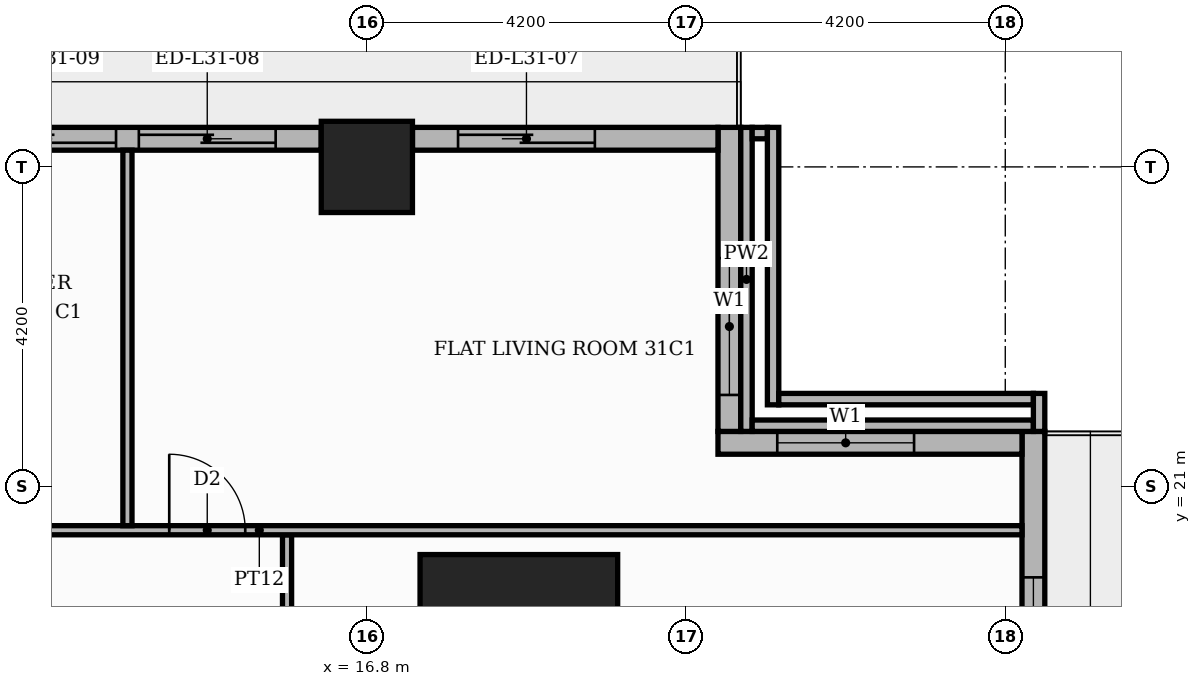
"""IFC4 building model, lengths in metres.
Left out: names, types, materials, properties, quantities, classifications, styles, units other than length and angle.
Written with IfcOpenShell. Run it as: python <this file> out.ifc"""

import sys

from ifc_helpers import new_model, si_unit, direction, frame, frame_2d, origin, origin_2d, place, context, subcontext, project, spatial, rectangle, extrude, element, fill, save


model = new_model("IFC4")
c1 = context("Model", 3, precision=1e-05, world=origin(), true_north=direction((0.0, 1.0)))
c2 = subcontext(c1, "Body", "Model", "MODEL_VIEW")
j1 = project(units=[si_unit("LENGTHUNIT", "METRE"), si_unit("PLANEANGLEUNIT", "RADIAN")], contexts=[c1])
p1 = place(None, origin())
s1 = spatial("IfcSite", under=j1, at=p1, CompositionType="ELEMENT")
p2 = place(p1, origin())
s2 = spatial("IfcBuilding", under=s1, at=p2, CompositionType="ELEMENT")
p3 = place(p2, frame((0.0, 0.0, 133.8)))
s3 = spatial("IfcBuildingStorey", under=s2, at=p3, CompositionType="ELEMENT", Elevation=133.8)
p4 = place(p3, frame((18.8, 18.8, 0.0), z_axis=(0.0, 0.0, 1.0), x_axis=(1.0, 0.0, 0.0)))
e1 = element("IfcColumn", 1, at=p4, inside=s3, PredefinedType="COLUMN", context=c2, shape_type="SweptSolid", body=[
    extrude(rectangle(XDim=2.6, YDim=2.6, at=origin_2d()), origin(), (0.0, 0.0, 1.0), 3.9),
])
p5 = place(p3, frame((16.8, 25.2, 0.0), z_axis=(0.0, 0.0, 1.0), x_axis=(1.0, 0.0, 0.0)))
e2 = element("IfcColumn", 2, at=p5, inside=s3, PredefinedType="COLUMN", context=c2, shape_type="SweptSolid", body=[
    extrude(rectangle(XDim=1.2, YDim=1.2, at=origin_2d()), origin(), (0.0, 0.0, 1.0), 3.9),
])
p6 = place(p3, frame((25.57, 17.4, 0.0), z_axis=(0.0, 0.0, 1.0), x_axis=(0.0, 1.0, 0.0)))
e3 = element("IfcWall", 3, at=p6, inside=s3, PredefinedType="STANDARD", context=c2, shape_type="SweptSolid", body=[
    extrude(rectangle(XDim=4.32, YDim=0.3, at=frame_2d((2.16, 0.0))), origin(), (0.0, 0.0, 1.0), 3.48),
])
p7 = place(p6, frame((0.6, 0.0, 0.9)))
e4 = element("IfcOpeningElement", 4, at=p7, cuts=e3, PredefinedType="OPENING", context=c2, shape_type="SweptSolid", body=[
    extrude(rectangle(XDim=1.8, YDim=2.1, at=frame_2d((0.9, 1.05))), frame((0.0, 0.16, 0.0), z_axis=(0.0, -1.0, 0.0), x_axis=(1.0, 0.0, 0.0)), (0.0, 0.0, 1.0), 0.32),
])
p8 = place(p3, frame((25.42, 21.57, 0.0), z_axis=(0.0, 0.0, 1.0), x_axis=(-1.0, 0.0, 0.0)))
e5 = element("IfcWall", 5, at=p8, inside=s3, PredefinedType="STANDARD", context=c2, shape_type="SweptSolid", body=[
    extrude(rectangle(XDim=4.0, YDim=0.3, at=frame_2d((2.0, 0.0))), origin(), (0.0, 0.0, 1.0), 3.48),
])
p9 = place(p8, frame((1.42, 0.0, 0.9)))
e6 = element("IfcOpeningElement", 6, at=p9, cuts=e5, PredefinedType="OPENING", context=c2, shape_type="SweptSolid", body=[
    extrude(rectangle(XDim=1.8, YDim=2.1, at=frame_2d((0.9, 1.05))), frame((0.0, 0.16, 0.0), z_axis=(0.0, -1.0, 0.0), x_axis=(1.0, 0.0, 0.0)), (0.0, 0.0, 1.0), 0.32),
])
p10 = place(p3, frame((21.57, 21.72, 0.0), z_axis=(0.0, 0.0, 1.0), x_axis=(0.0, 1.0, 0.0)))
e7 = element("IfcWall", 7, at=p10, inside=s3, PredefinedType="STANDARD", context=c2, shape_type="SweptSolid", body=[
    extrude(rectangle(XDim=4.0, YDim=0.3, at=frame_2d((2.0, 0.0))), origin(), (0.0, 0.0, 1.0), 3.48),
])
p11 = place(p10, frame((0.48, 0.0, 0.9)))
e8 = element("IfcOpeningElement", 8, at=p11, cuts=e7, PredefinedType="OPENING", context=c2, shape_type="SweptSolid", body=[
    extrude(rectangle(XDim=1.8, YDim=2.1, at=frame_2d((0.9, 1.05))), frame((0.0, 0.16, 0.0), z_axis=(0.0, -1.0, 0.0), x_axis=(1.0, 0.0, 0.0)), (0.0, 0.0, 1.0), 0.32),
])
p12 = place(p3, frame((21.42, 25.57, 0.0), z_axis=(0.0, 0.0, 1.0), x_axis=(-1.0, 0.0, 0.0)))
e9 = element("IfcWall", 9, at=p12, inside=s3, PredefinedType="STANDARD", context=c2, shape_type="SweptSolid", body=[
    extrude(rectangle(XDim=4.02, YDim=0.3, at=frame_2d((2.01, 0.0))), origin(), (0.0, 0.0, 1.0), 3.48),
])
p13 = place(p12, frame((1.62, 0.0, 0.0)))
e10 = element("IfcOpeningElement", 10, at=p13, cuts=e9, PredefinedType="OPENING", context=c2, shape_type="SweptSolid", body=[
    extrude(rectangle(XDim=1.8, YDim=2.4, at=frame_2d((0.9, 1.2))), frame((0.0, 0.16, 0.0), z_axis=(0.0, -1.0, 0.0), x_axis=(1.0, 0.0, 0.0)), (0.0, 0.0, 1.0), 0.32),
])
p14 = place(p3, frame((16.2, 25.57, 0.0), z_axis=(0.0, 0.0, 1.0), x_axis=(-1.0, 0.0, 0.0)))
e11 = element("IfcWall", 11, at=p14, inside=s3, PredefinedType="STANDARD", context=c2, shape_type="SweptSolid", body=[
    extrude(rectangle(XDim=7.2, YDim=0.3, at=frame_2d((3.6, 0.0))), origin(), (0.0, 0.0, 1.0), 3.48),
])
p15 = place(p14, frame((0.6, 0.0, 0.0)))
e12 = element("IfcOpeningElement", 12, at=p15, cuts=e11, PredefinedType="OPENING", context=c2, shape_type="SweptSolid", body=[
    extrude(rectangle(XDim=1.8, YDim=2.4, at=frame_2d((0.9, 1.2))), frame((0.0, 0.16, 0.0), z_axis=(0.0, -1.0, 0.0), x_axis=(1.0, 0.0, 0.0)), (0.0, 0.0, 1.0), 0.32),
])
p16 = place(p14, frame((2.7, 0.0, 0.0)))
e13 = element("IfcOpeningElement", 13, at=p16, cuts=e11, PredefinedType="OPENING", context=c2, shape_type="SweptSolid", body=[
    extrude(rectangle(XDim=1.8, YDim=2.4, at=frame_2d((0.9, 1.2))), frame((0.0, 0.16, 0.0), z_axis=(0.0, -1.0, 0.0), x_axis=(1.0, 0.0, 0.0)), (0.0, 0.0, 1.0), 0.32),
])
p17 = place(p14, frame((4.8, 0.0, 0.9)))
e14 = element("IfcOpeningElement", 14, at=p17, cuts=e11, PredefinedType="OPENING", context=c2, shape_type="SweptSolid", body=[
    extrude(rectangle(XDim=1.8, YDim=2.1, at=frame_2d((0.9, 1.05))), frame((0.0, 0.16, 0.0), z_axis=(0.0, -1.0, 0.0), x_axis=(1.0, 0.0, 0.0)), (0.0, 0.0, 1.0), 0.32),
])
p18 = place(p3, frame((21.795, 21.72, 0.0), z_axis=(0.0, 0.0, 1.0), x_axis=(0.0, 1.0, 0.0)))
e15 = element("IfcWall", 15, at=p18, inside=s3, PredefinedType="PARAPET", context=c2, shape_type="SweptSolid", body=[
    extrude(rectangle(XDim=4.0, YDim=0.15, at=frame_2d((2.0, 0.0))), origin(), (0.0, 0.0, 1.0), 1.1),
])
p19 = place(p3, frame((21.87, 25.645, 0.0), z_axis=(0.0, 0.0, 1.0), x_axis=(1.0, 0.0, 0.0)))
e16 = element("IfcWall", 16, at=p19, inside=s3, PredefinedType="PARAPET", context=c2, shape_type="SweptSolid", body=[
    extrude(rectangle(XDim=0.2, YDim=0.15, at=frame_2d((0.1, 0.0))), origin(), (0.0, 0.0, 1.0), 1.1),
])
p20 = place(p3, frame((21.87, 21.795, 0.0), z_axis=(0.0, 0.0, 1.0), x_axis=(1.0, 0.0, 0.0)))
e17 = element("IfcWall", 17, at=p20, inside=s3, PredefinedType="PARAPET", context=c2, shape_type="SweptSolid", body=[
    extrude(rectangle(XDim=3.7, YDim=0.15, at=frame_2d((1.85, 0.0))), origin(), (0.0, 0.0, 1.0), 1.1),
])
p21 = place(p3, frame((22.145, 22.07, 0.0), z_axis=(0.0, 0.0, 1.0), x_axis=(0.0, 1.0, 0.0)))
e18 = element("IfcWall", 18, at=p21, inside=s3, PredefinedType="PARAPET", context=c2, shape_type="SweptSolid", body=[
    extrude(rectangle(XDim=3.65, YDim=0.15, at=frame_2d((1.825, 0.0))), origin(), (0.0, 0.0, 1.0), 1.1),
])
p22 = place(p3, frame((22.22, 22.145, 0.0), z_axis=(0.0, 0.0, 1.0), x_axis=(1.0, 0.0, 0.0)))
e19 = element("IfcWall", 19, at=p22, inside=s3, PredefinedType="PARAPET", context=c2, shape_type="SweptSolid", body=[
    extrude(rectangle(XDim=3.35, YDim=0.15, at=frame_2d((1.675, 0.0))), origin(), (0.0, 0.0, 1.0), 1.1),
])
p23 = place(p3, frame((25.645, 21.72, 0.0), z_axis=(0.0, 0.0, 1.0), x_axis=(0.0, 1.0, 0.0)))
e20 = element("IfcWall", 20, at=p23, inside=s3, PredefinedType="PARAPET", context=c2, shape_type="SweptSolid", body=[
    extrude(rectangle(XDim=0.5, YDim=0.15, at=frame_2d((0.25, 0.0))), origin(), (0.0, 0.0, 1.0), 1.1),
])
p24 = place(p3, frame((15.75, 13.75, 0.0), z_axis=(0.0, 0.0, 1.0), x_axis=(0.0, 1.0, 0.0)))
e21 = element("IfcWall", 21, at=p24, inside=s3, PredefinedType="PARTITIONING", context=c2, shape_type="SweptSolid", body=[
    extrude(rectangle(XDim=6.61, YDim=0.12, at=frame_2d((3.305, 0.0))), origin(), (0.0, 0.0, 1.0), 3.48),
])
p25 = place(p24, frame((2.785, 0.0, 0.0)))
e22 = element("IfcOpeningElement", 22, at=p25, cuts=e21, PredefinedType="OPENING", context=c2, shape_type="SweptSolid", body=[
    extrude(rectangle(XDim=1.0, YDim=2.1, at=frame_2d((0.5, 1.05))), frame((0.0, 0.07, 0.0), z_axis=(0.0, -1.0, 0.0), x_axis=(1.0, 0.0, 0.0)), (0.0, 0.0, 1.0), 0.14),
])
p26 = place(p3, frame((5.35, 20.42, 0.0), z_axis=(0.0, 0.0, 1.0), x_axis=(1.0, 0.0, 0.0)))
e23 = element("IfcWall", 23, at=p26, inside=s3, PredefinedType="PARTITIONING", context=c2, shape_type="SweptSolid", body=[
    extrude(rectangle(XDim=20.07, YDim=0.12, at=frame_2d((10.035, 0.0))), origin(), (0.0, 0.0, 1.0), 3.48),
])
p27 = place(p26, frame((8.85, 0.0, 0.0)))
e24 = element("IfcOpeningElement", 24, at=p27, cuts=e23, PredefinedType="OPENING", context=c2, shape_type="SweptSolid", body=[
    extrude(rectangle(XDim=1.0, YDim=2.1, at=frame_2d((0.5, 1.05))), frame((0.0, 0.07, 0.0), z_axis=(0.0, -1.0, 0.0), x_axis=(1.0, 0.0, 0.0)), (0.0, 0.0, 1.0), 0.14),
])
p28 = place(p26, frame((5.75, 0.0, 0.0)))
e25 = element("IfcOpeningElement", 25, at=p28, cuts=e23, PredefinedType="OPENING", context=c2, shape_type="SweptSolid", body=[
    extrude(rectangle(XDim=0.9, YDim=2.1, at=frame_2d((0.45, 1.05))), frame((0.0, 0.07, 0.0), z_axis=(0.0, -1.0, 0.0), x_axis=(1.0, 0.0, 0.0)), (0.0, 0.0, 1.0), 0.14),
])
p29 = place(p3, frame((13.65, 20.48, 0.0), z_axis=(0.0, 0.0, 1.0), x_axis=(0.0, 1.0, 0.0)))
e26 = element("IfcWall", 26, at=p29, inside=s3, PredefinedType="PARTITIONING", context=c2, shape_type="SweptSolid", body=[
    extrude(rectangle(XDim=4.94, YDim=0.12, at=frame_2d((2.47, 0.0))), origin(), (0.0, 0.0, 1.0), 3.48),
])
p30 = place(p7, origin())
e27 = element("IfcWindow", 27, at=p30, inside=s3, PartitioningType="SINGLE_PANEL", PredefinedType="WINDOW", context=c2, shape_type="SweptSolid", body=[
    extrude(rectangle(XDim=1.8, YDim=2.1, at=frame_2d((0.9, 1.05))), frame((0.0, 0.03, 0.0), z_axis=(0.0, -1.0, 0.0), x_axis=(1.0, 0.0, 0.0)), (0.0, 0.0, 1.0), 0.06),
])
fill(e4, e27)
p31 = place(p9, origin())
e28 = element("IfcWindow", 28, at=p31, inside=s3, PartitioningType="SINGLE_PANEL", PredefinedType="WINDOW", context=c2, shape_type="SweptSolid", body=[
    extrude(rectangle(XDim=1.8, YDim=2.1, at=frame_2d((0.9, 1.05))), frame((0.0, 0.03, 0.0), z_axis=(0.0, -1.0, 0.0), x_axis=(1.0, 0.0, 0.0)), (0.0, 0.0, 1.0), 0.06),
])
fill(e6, e28)
p32 = place(p11, origin())
e29 = element("IfcWindow", 29, at=p32, inside=s3, PartitioningType="SINGLE_PANEL", PredefinedType="WINDOW", context=c2, shape_type="SweptSolid", body=[
    extrude(rectangle(XDim=1.8, YDim=2.1, at=frame_2d((0.9, 1.05))), frame((0.0, 0.03, 0.0), z_axis=(0.0, -1.0, 0.0), x_axis=(1.0, 0.0, 0.0)), (0.0, 0.0, 1.0), 0.06),
])
fill(e8, e29)
p33 = place(p13, origin())
e30 = element("IfcDoor", 30, at=p33, inside=s3, OperationType="SLIDING_TO_RIGHT", PredefinedType="DOOR", context=c2, shape_type="SweptSolid", body=[
    extrude(rectangle(XDim=1.8, YDim=2.4, at=frame_2d((0.9, 1.2))), frame((0.0, 0.025, 0.0), z_axis=(0.0, -1.0, 0.0), x_axis=(1.0, 0.0, 0.0)), (0.0, 0.0, 1.0), 0.05),
])
fill(e10, e30)
p34 = place(p15, origin())
e31 = element("IfcDoor", 31, at=p34, inside=s3, OperationType="SLIDING_TO_LEFT", PredefinedType="DOOR", context=c2, shape_type="SweptSolid", body=[
    extrude(rectangle(XDim=1.8, YDim=2.4, at=frame_2d((0.9, 1.2))), frame((0.0, 0.025, 0.0), z_axis=(0.0, -1.0, 0.0), x_axis=(1.0, 0.0, 0.0)), (0.0, 0.0, 1.0), 0.05),
])
fill(e12, e31)
p35 = place(p16, origin())
e32 = element("IfcDoor", 32, at=p35, inside=s3, OperationType="SLIDING_TO_RIGHT", PredefinedType="DOOR", context=c2, shape_type="SweptSolid", body=[
    extrude(rectangle(XDim=1.8, YDim=2.4, at=frame_2d((0.9, 1.2))), frame((0.0, 0.025, 0.0), z_axis=(0.0, -1.0, 0.0), x_axis=(1.0, 0.0, 0.0)), (0.0, 0.0, 1.0), 0.05),
])
fill(e13, e32)
p36 = place(p27, origin())
e33 = element("IfcDoor", 33, at=p36, inside=s3, OperationType="SINGLE_SWING_LEFT", PredefinedType="DOOR", context=c2, shape_type="SweptSolid", body=[
    extrude(rectangle(XDim=1.0, YDim=2.1, at=frame_2d((0.5, 1.05))), frame((0.0, 0.025, 0.0), z_axis=(0.0, -1.0, 0.0), x_axis=(1.0, 0.0, 0.0)), (0.0, 0.0, 1.0), 0.05),
])
fill(e24, e33)
save(model, sys.argv[1])
